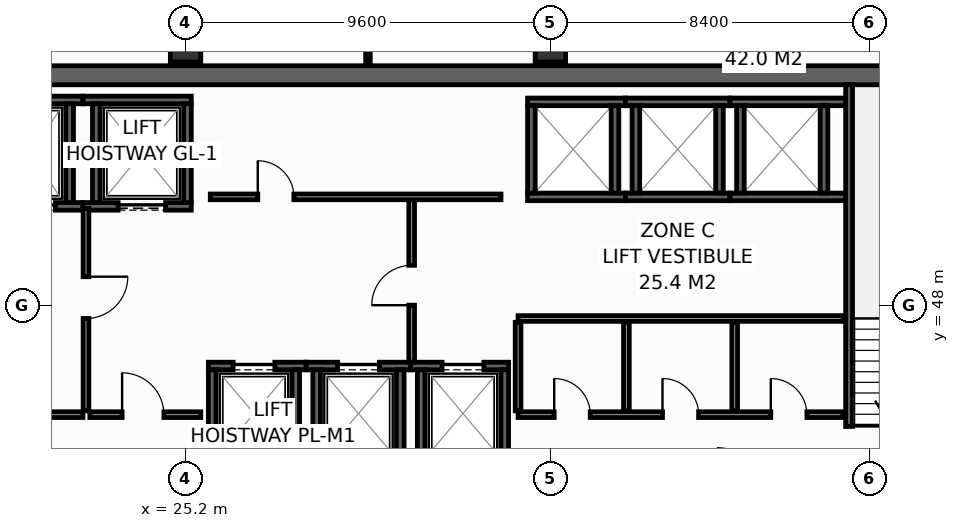
"""IFC4 building model, lengths in metres.
Left out: names, types, materials, properties, quantities, classifications, styles, units other than length and angle.
Written with IfcOpenShell. Run it as: python <this file> out.ifc"""

import sys

from ifc_helpers import new_model, si_unit, direction, frame, frame_2d, origin, origin_2d, place, context, subcontext, project, spatial, rectangle, hollow_rectangle, extrude, element, fill, save


model = new_model("IFC4")
c1 = context("Model", 3, precision=1e-05, world=origin(), true_north=direction((0.0, 1.0)))
c2 = subcontext(c1, "Body", "Model", "MODEL_VIEW")
j1 = project(units=[si_unit("LENGTHUNIT", "METRE"), si_unit("PLANEANGLEUNIT", "RADIAN")], contexts=[c1])
p1 = place(None, origin())
s1 = spatial("IfcSite", under=j1, at=p1, CompositionType="ELEMENT")
p2 = place(p1, origin())
s2 = spatial("IfcBuilding", under=s1, at=p2, CompositionType="ELEMENT")
p3 = place(p2, frame((0.0, 0.0, 201.8)))
s3 = spatial("IfcBuildingStorey", under=s2, at=p3, CompositionType="ELEMENT", Elevation=201.8)
p4 = place(p3, frame((13.6, 54.05, 0.0), z_axis=(0.0, 0.0, 1.0), x_axis=(1.0, 0.0, 0.0)))
e1 = element("IfcWall", 1, at=p4, inside=s3, PredefinedType="SHEAR", context=c2, shape_type="SweptSolid", body=[
    extrude(rectangle(XDim=32.7, YDim=0.5, at=frame_2d((16.35, 0.0))), origin(), (0.0, 0.0, 1.0), 3.55),
])
for number, where, z_axis, x_axis in (
    (2, (25.2, 54.8, 0.0), (0.0, 0.0, 1.0), (1.0, 0.0, 0.0)),
    (3, (34.8, 54.8, 0.0), (0.0, 0.0, 1.0), (1.0, 0.0, 0.0)),
):
    element("IfcColumn", number, at=place(p3, frame(where, z_axis=z_axis, x_axis=x_axis)), inside=s3, PredefinedType="COLUMN", context=c2, shape_type="SweptSolid", body=[
        extrude(hollow_rectangle(XDim=0.8, YDim=0.8, WallThickness=0.036, at=origin_2d()), origin(), (0.0, 0.0, 1.0), 3.8),
    ])
p5 = place(p3, frame((19.85, 50.6, 0.0), z_axis=(0.0, 0.0, 1.0), x_axis=(1.0, 0.0, 0.0)))
e4 = element("IfcWall", 4, at=p5, inside=s3, PredefinedType="SHEAR", context=c2, shape_type="SweptSolid", body=[
    extrude(rectangle(XDim=2.65, YDim=0.2, at=frame_2d((1.325, 0.0))), origin(), (0.0, 0.0, 1.0), 3.55),
])
p6 = place(p5, frame((0.675, 0.0, 0.0)))
e5 = element("IfcOpeningElement", 5, at=p6, cuts=e4, PredefinedType="OPENING", context=c2, shape_type="SweptSolid", body=[
    extrude(rectangle(XDim=1.25, YDim=2.3, at=frame_2d((0.625, 1.15))), frame((0.0, 0.11, 0.0), z_axis=(0.0, -1.0, 0.0), x_axis=(1.0, 0.0, 0.0)), (0.0, 0.0, 1.0), 0.22),
])
p7 = place(p3, frame((19.85, 53.4, 0.0), z_axis=(0.0, 0.0, 1.0), x_axis=(1.0, 0.0, 0.0)))
e6 = element("IfcWall", 6, at=p7, inside=s3, PredefinedType="SHEAR", context=c2, shape_type="SweptSolid", body=[
    extrude(rectangle(XDim=2.65, YDim=0.2, at=frame_2d((1.325, 0.0))), origin(), (0.0, 0.0, 1.0), 3.55),
])
p8 = place(p3, frame((22.15, 50.7, 0.0), z_axis=(0.0, 0.0, 1.0), x_axis=(0.0, 1.0, 0.0)))
e7 = element("IfcWall", 7, at=p8, inside=s3, PredefinedType="SHEAR", context=c2, shape_type="SweptSolid", body=[
    extrude(rectangle(XDim=2.6, YDim=0.2, at=frame_2d((1.3, 0.0))), origin(), (0.0, 0.0, 1.0), 3.55),
])
p9 = place(p3, frame((22.5, 50.6, 0.0), z_axis=(0.0, 0.0, 1.0), x_axis=(1.0, 0.0, 0.0)))
e8 = element("IfcWall", 8, at=p9, inside=s3, PredefinedType="SHEAR", context=c2, shape_type="SweptSolid", body=[
    extrude(rectangle(XDim=2.85, YDim=0.2, at=frame_2d((1.425, 0.0))), origin(), (0.0, 0.0, 1.0), 3.55),
])
p10 = place(p9, frame((0.925, 0.0, 0.0)))
e9 = element("IfcOpeningElement", 9, at=p10, cuts=e8, PredefinedType="OPENING", context=c2, shape_type="SweptSolid", body=[
    extrude(rectangle(XDim=1.25, YDim=2.3, at=frame_2d((0.625, 1.15))), frame((0.0, 0.11, 0.0), z_axis=(0.0, -1.0, 0.0), x_axis=(1.0, 0.0, 0.0)), (0.0, 0.0, 1.0), 0.22),
])
p11 = place(p3, frame((22.5, 53.4, 0.0), z_axis=(0.0, 0.0, 1.0), x_axis=(1.0, 0.0, 0.0)))
e10 = element("IfcWall", 10, at=p11, inside=s3, PredefinedType="SHEAR", context=c2, shape_type="SweptSolid", body=[
    extrude(rectangle(XDim=2.85, YDim=0.2, at=frame_2d((1.425, 0.0))), origin(), (0.0, 0.0, 1.0), 3.55),
])
for number, where, z_axis, x_axis in (
    (11, (22.85, 50.7, 0.0), (0.0, 0.0, 1.0), (0.0, 1.0, 0.0)),
    (12, (25.25, 50.7, 0.0), (0.0, 0.0, 1.0), (0.0, 1.0, 0.0)),
):
    element("IfcWall", number, at=place(p3, frame(where, z_axis=z_axis, x_axis=x_axis)), inside=s3, PredefinedType="SHEAR", context=c2, shape_type="SweptSolid", body=[
        extrude(rectangle(XDim=2.6, YDim=0.2, at=frame_2d((1.3, 0.0))), origin(), (0.0, 0.0, 1.0), 3.55),
    ])
p12 = place(p3, frame((25.8, 46.4, 0.0), z_axis=(0.0, 0.0, 1.0), x_axis=(1.0, 0.0, 0.0)))
e13 = element("IfcWall", 13, at=p12, inside=s3, PredefinedType="SHEAR", context=c2, shape_type="SweptSolid", body=[
    extrude(rectangle(XDim=2.575, YDim=0.2, at=frame_2d((1.288, 0.0))), origin(), (0.0, 0.0, 1.0), 3.55),
])
p13 = place(p12, frame((0.65, 0.0, 0.0)))
e14 = element("IfcOpeningElement", 14, at=p13, cuts=e13, PredefinedType="OPENING", context=c2, shape_type="SweptSolid", body=[
    extrude(rectangle(XDim=1.1, YDim=2.2, at=frame_2d((0.55, 1.1))), frame((0.0, 0.11, 0.0), z_axis=(0.0, -1.0, 0.0), x_axis=(1.0, 0.0, 0.0)), (0.0, 0.0, 1.0), 0.22),
])
for number, where, z_axis, x_axis in (
    (15, (25.9, 44.0, 0.0), (0.0, 0.0, 1.0), (0.0, 1.0, 0.0)),
    (16, (28.1, 44.0, 0.0), (0.0, 0.0, 1.0), (0.0, 1.0, 0.0)),
):
    element("IfcWall", number, at=place(p3, frame(where, z_axis=z_axis, x_axis=x_axis)), inside=s3, PredefinedType="SHEAR", context=c2, shape_type="SweptSolid", body=[
        extrude(rectangle(XDim=2.3, YDim=0.2, at=frame_2d((1.15, 0.0))), origin(), (0.0, 0.0, 1.0), 3.55),
    ])
p14 = place(p3, frame((28.375, 46.4, 0.0), z_axis=(0.0, 0.0, 1.0), x_axis=(1.0, 0.0, 0.0)))
e17 = element("IfcWall", 17, at=p14, inside=s3, PredefinedType="SHEAR", context=c2, shape_type="SweptSolid", body=[
    extrude(rectangle(XDim=2.75, YDim=0.2, at=frame_2d((1.375, 0.0))), origin(), (0.0, 0.0, 1.0), 3.55),
])
p15 = place(p14, frame((0.825, 0.0, 0.0)))
e18 = element("IfcOpeningElement", 18, at=p15, cuts=e17, PredefinedType="OPENING", context=c2, shape_type="SweptSolid", body=[
    extrude(rectangle(XDim=1.1, YDim=2.2, at=frame_2d((0.55, 1.1))), frame((0.0, 0.11, 0.0), z_axis=(0.0, -1.0, 0.0), x_axis=(1.0, 0.0, 0.0)), (0.0, 0.0, 1.0), 0.22),
])
for number, where, z_axis, x_axis in (
    (19, (28.65, 44.0, 0.0), (0.0, 0.0, 1.0), (0.0, 1.0, 0.0)),
    (20, (30.85, 44.0, 0.0), (0.0, 0.0, 1.0), (0.0, 1.0, 0.0)),
):
    element("IfcWall", number, at=place(p3, frame(where, z_axis=z_axis, x_axis=x_axis)), inside=s3, PredefinedType="SHEAR", context=c2, shape_type="SweptSolid", body=[
        extrude(rectangle(XDim=2.3, YDim=0.2, at=frame_2d((1.15, 0.0))), origin(), (0.0, 0.0, 1.0), 3.55),
    ])
p16 = place(p3, frame((31.125, 46.4, 0.0), z_axis=(0.0, 0.0, 1.0), x_axis=(1.0, 0.0, 0.0)))
e21 = element("IfcWall", 21, at=p16, inside=s3, PredefinedType="SHEAR", context=c2, shape_type="SweptSolid", body=[
    extrude(rectangle(XDim=2.575, YDim=0.2, at=frame_2d((1.288, 0.0))), origin(), (0.0, 0.0, 1.0), 3.55),
])
p17 = place(p16, frame((0.825, 0.0, 0.0)))
e22 = element("IfcOpeningElement", 22, at=p17, cuts=e21, PredefinedType="OPENING", context=c2, shape_type="SweptSolid", body=[
    extrude(rectangle(XDim=1.1, YDim=2.2, at=frame_2d((0.55, 1.1))), frame((0.0, 0.11, 0.0), z_axis=(0.0, -1.0, 0.0), x_axis=(1.0, 0.0, 0.0)), (0.0, 0.0, 1.0), 0.22),
])
for number, where, z_axis, x_axis in (
    (23, (31.4, 44.0, 0.0), (0.0, 0.0, 1.0), (0.0, 1.0, 0.0)),
    (24, (33.6, 44.0, 0.0), (0.0, 0.0, 1.0), (0.0, 1.0, 0.0)),
):
    element("IfcWall", number, at=place(p3, frame(where, z_axis=z_axis, x_axis=x_axis)), inside=s3, PredefinedType="SHEAR", context=c2, shape_type="SweptSolid", body=[
        extrude(rectangle(XDim=2.3, YDim=0.2, at=frame_2d((1.15, 0.0))), origin(), (0.0, 0.0, 1.0), 3.55),
    ])
for number, where, z_axis, x_axis in (
    (25, (34.2, 50.85, 0.0), (0.0, 0.0, 1.0), (1.0, 0.0, 0.0)),
    (26, (34.2, 53.35, 0.0), (0.0, 0.0, 1.0), (1.0, 0.0, 0.0)),
):
    element("IfcWall", number, at=place(p3, frame(where, z_axis=z_axis, x_axis=x_axis)), inside=s3, PredefinedType="SHEAR", context=c2, shape_type="SweptSolid", body=[
        extrude(rectangle(XDim=2.575, YDim=0.2, at=frame_2d((1.288, 0.0))), origin(), (0.0, 0.0, 1.0), 3.55),
    ])
for number, where, z_axis, x_axis in (
    (27, (34.3, 50.95, 0.0), (0.0, 0.0, 1.0), (0.0, 1.0, 0.0)),
    (28, (36.5, 50.95, 0.0), (0.0, 0.0, 1.0), (0.0, 1.0, 0.0)),
):
    element("IfcWall", number, at=place(p3, frame(where, z_axis=z_axis, x_axis=x_axis)), inside=s3, PredefinedType="SHEAR", context=c2, shape_type="SweptSolid", body=[
        extrude(rectangle(XDim=2.3, YDim=0.2, at=frame_2d((1.15, 0.0))), origin(), (0.0, 0.0, 1.0), 3.55),
    ])
for number, where, z_axis, x_axis in (
    (29, (36.775, 50.85, 0.0), (0.0, 0.0, 1.0), (1.0, 0.0, 0.0)),
    (30, (36.775, 53.35, 0.0), (0.0, 0.0, 1.0), (1.0, 0.0, 0.0)),
):
    element("IfcWall", number, at=place(p3, frame(where, z_axis=z_axis, x_axis=x_axis)), inside=s3, PredefinedType="SHEAR", context=c2, shape_type="SweptSolid", body=[
        extrude(rectangle(XDim=2.75, YDim=0.2, at=frame_2d((1.375, 0.0))), origin(), (0.0, 0.0, 1.0), 3.55),
    ])
for number, where, z_axis, x_axis in (
    (31, (37.05, 50.95, 0.0), (0.0, 0.0, 1.0), (0.0, 1.0, 0.0)),
    (32, (39.25, 50.95, 0.0), (0.0, 0.0, 1.0), (0.0, 1.0, 0.0)),
):
    element("IfcWall", number, at=place(p3, frame(where, z_axis=z_axis, x_axis=x_axis)), inside=s3, PredefinedType="SHEAR", context=c2, shape_type="SweptSolid", body=[
        extrude(rectangle(XDim=2.3, YDim=0.2, at=frame_2d((1.15, 0.0))), origin(), (0.0, 0.0, 1.0), 3.55),
    ])
for number, where, z_axis, x_axis in (
    (33, (39.525, 50.85, 0.0), (0.0, 0.0, 1.0), (1.0, 0.0, 0.0)),
    (34, (39.525, 53.35, 0.0), (0.0, 0.0, 1.0), (1.0, 0.0, 0.0)),
):
    element("IfcWall", number, at=place(p3, frame(where, z_axis=z_axis, x_axis=x_axis)), inside=s3, PredefinedType="SHEAR", context=c2, shape_type="SweptSolid", body=[
        extrude(rectangle(XDim=3.045, YDim=0.2, at=frame_2d((1.522, 0.0))), origin(), (0.0, 0.0, 1.0), 3.55),
    ])
for number, where, z_axis, x_axis in (
    (35, (39.8, 50.95, 0.0), (0.0, 0.0, 1.0), (0.0, 1.0, 0.0)),
    (36, (42.0, 50.95, 0.0), (0.0, 0.0, 1.0), (0.0, 1.0, 0.0)),
):
    element("IfcWall", number, at=place(p3, frame(where, z_axis=z_axis, x_axis=x_axis)), inside=s3, PredefinedType="SHEAR", context=c2, shape_type="SweptSolid", body=[
        extrude(rectangle(XDim=2.3, YDim=0.2, at=frame_2d((1.15, 0.0))), origin(), (0.0, 0.0, 1.0), 3.55),
    ])
p18 = place(p3, frame((42.66, 53.8, 0.0), z_axis=(0.0, 0.0, 1.0), x_axis=(0.0, -1.0, 0.0)))
e37 = element("IfcWall", 37, at=p18, inside=s3, PredefinedType="SHEAR", context=c2, shape_type="SweptSolid", body=[
    extrude(rectangle(XDim=10.4, YDim=0.18, at=frame_2d((5.2, 0.0))), origin(), (0.0, 0.0, 1.0), 3.55),
])
p19 = place(p18, frame((8.99, 0.0, 0.0)))
e38 = element("IfcOpeningElement", 38, at=p19, cuts=e37, PredefinedType="OPENING", context=c2, shape_type="SweptSolid", body=[
    extrude(rectangle(XDim=1.1, YDim=2.15, at=frame_2d((0.55, 1.075))), frame((0.0, 0.1, 0.0), z_axis=(0.0, -1.0, 0.0), x_axis=(1.0, 0.0, 0.0)), (0.0, 0.0, 1.0), 0.2),
])
p20 = place(p3, frame((17.36, 45.12, 0.0), z_axis=(0.0, 0.0, 1.0), x_axis=(1.0, 0.0, 0.0)))
e39 = element("IfcWall", 39, at=p20, inside=s3, PredefinedType="PARTITIONING", context=c2, shape_type="SweptSolid", body=[
    extrude(rectangle(XDim=5.14, YDim=0.15, at=frame_2d((2.57, 0.0))), origin(), (0.0, 0.0, 1.0), 3.55),
])
p21 = place(p20, frame((1.8, 0.0, 0.0)))
e40 = element("IfcOpeningElement", 40, at=p21, cuts=e39, PredefinedType="OPENING", context=c2, shape_type="SweptSolid", body=[
    extrude(rectangle(XDim=1.1, YDim=2.15, at=frame_2d((0.55, 1.075))), frame((0.0, 0.085, 0.0), z_axis=(0.0, -1.0, 0.0), x_axis=(1.0, 0.0, 0.0)), (0.0, 0.0, 1.0), 0.17),
])
p22 = place(p3, frame((22.58, 50.55, 0.0), z_axis=(0.0, 0.0, 1.0), x_axis=(0.0, -1.0, 0.0)))
e41 = element("IfcWall", 41, at=p22, inside=s3, PredefinedType="PARTITIONING", context=c2, shape_type="SweptSolid", body=[
    extrude(rectangle(XDim=5.33, YDim=0.15, at=frame_2d((2.665, 0.0))), origin(), (0.0, 0.0, 1.0), 3.55),
])
p23 = place(p22, frame((1.8, 0.0, 0.0)))
e42 = element("IfcOpeningElement", 42, at=p23, cuts=e41, PredefinedType="OPENING", context=c2, shape_type="SweptSolid", body=[
    extrude(rectangle(XDim=1.1, YDim=2.15, at=frame_2d((0.55, 1.075))), frame((0.0, 0.085, 0.0), z_axis=(0.0, -1.0, 0.0), x_axis=(1.0, 0.0, 0.0)), (0.0, 0.0, 1.0), 0.17),
])
p24 = place(p3, frame((22.68, 45.12, 0.0), z_axis=(0.0, 0.0, 1.0), x_axis=(1.0, 0.0, 0.0)))
e43 = element("IfcWall", 43, at=p24, inside=s3, PredefinedType="PARTITIONING", context=c2, shape_type="SweptSolid", body=[
    extrude(rectangle(XDim=2.92, YDim=0.15, at=frame_2d((1.46, 0.0))), origin(), (0.0, 0.0, 1.0), 3.55),
])
p25 = place(p24, frame((0.85, 0.0, 0.0)))
e44 = element("IfcOpeningElement", 44, at=p25, cuts=e43, PredefinedType="OPENING", context=c2, shape_type="SweptSolid", body=[
    extrude(rectangle(XDim=1.1, YDim=2.15, at=frame_2d((0.55, 1.075))), frame((0.0, 0.085, 0.0), z_axis=(0.0, -1.0, 0.0), x_axis=(1.0, 0.0, 0.0)), (0.0, 0.0, 1.0), 0.17),
])
p26 = place(p3, frame((31.15, 46.5, 0.0), z_axis=(0.0, 0.0, 1.0), x_axis=(0.0, 1.0, 0.0)))
e45 = element("IfcWall", 45, at=p26, inside=s3, PredefinedType="PARTITIONING", context=c2, shape_type="SweptSolid", body=[
    extrude(rectangle(XDim=4.35, YDim=0.15, at=frame_2d((2.175, 0.0))), origin(), (0.0, 0.0, 1.0), 3.55),
])
p27 = place(p26, frame((1.5, 0.0, 0.0)))
e46 = element("IfcOpeningElement", 46, at=p27, cuts=e45, PredefinedType="OPENING", context=c2, shape_type="SweptSolid", body=[
    extrude(rectangle(XDim=1.05, YDim=2.15, at=frame_2d((0.525, 1.075))), frame((0.0, 0.085, 0.0), z_axis=(0.0, -1.0, 0.0), x_axis=(1.0, 0.0, 0.0)), (0.0, 0.0, 1.0), 0.17),
])
p28 = place(p3, frame((33.95, 45.12, 0.0), z_axis=(0.0, 0.0, 1.0), x_axis=(1.0, 0.0, 0.0)))
e47 = element("IfcWall", 47, at=p28, inside=s3, PredefinedType="PARTITIONING", context=c2, shape_type="SweptSolid", body=[
    extrude(rectangle(XDim=8.55, YDim=0.15, at=frame_2d((4.275, 0.0))), origin(), (0.0, 0.0, 1.0), 3.55),
])
p29 = place(p28, frame((0.95, 0.0, 0.0)))
e48 = element("IfcOpeningElement", 48, at=p29, cuts=e47, PredefinedType="OPENING", context=c2, shape_type="SweptSolid", body=[
    extrude(rectangle(XDim=0.95, YDim=2.15, at=frame_2d((0.475, 1.075))), frame((0.0, 0.085, 0.0), z_axis=(0.0, -1.0, 0.0), x_axis=(1.0, 0.0, 0.0)), (0.0, 0.0, 1.0), 0.17),
])
p30 = place(p28, frame((3.8, 0.0, 0.0)))
e49 = element("IfcOpeningElement", 49, at=p30, cuts=e47, PredefinedType="OPENING", context=c2, shape_type="SweptSolid", body=[
    extrude(rectangle(XDim=0.95, YDim=2.15, at=frame_2d((0.475, 1.075))), frame((0.0, 0.085, 0.0), z_axis=(0.0, -1.0, 0.0), x_axis=(1.0, 0.0, 0.0)), (0.0, 0.0, 1.0), 0.17),
])
p31 = place(p28, frame((6.65, 0.0, 0.0)))
e50 = element("IfcOpeningElement", 50, at=p31, cuts=e47, PredefinedType="OPENING", context=c2, shape_type="SweptSolid", body=[
    extrude(rectangle(XDim=0.95, YDim=2.15, at=frame_2d((0.475, 1.075))), frame((0.0, 0.085, 0.0), z_axis=(0.0, -1.0, 0.0), x_axis=(1.0, 0.0, 0.0)), (0.0, 0.0, 1.0), 0.17),
])
p32 = place(p3, frame((33.95, 47.65, 0.0), z_axis=(0.0, 0.0, 1.0), x_axis=(1.0, 0.0, 0.0)))
e51 = element("IfcWall", 51, at=p32, inside=s3, PredefinedType="PARTITIONING", context=c2, shape_type="SweptSolid", body=[
    extrude(rectangle(XDim=8.55, YDim=0.15, at=frame_2d((4.275, 0.0))), origin(), (0.0, 0.0, 1.0), 3.55),
])
for number, where, z_axis, x_axis in (
    (52, (33.95, 45.22, 0.0), (0.0, 0.0, 1.0), (0.0, 1.0, 0.0)),
    (53, (36.8, 45.22, 0.0), (0.0, 0.0, 1.0), (0.0, 1.0, 0.0)),
    (54, (39.65, 45.22, 0.0), (0.0, 0.0, 1.0), (0.0, 1.0, 0.0)),
):
    element("IfcWall", number, at=place(p3, frame(where, z_axis=z_axis, x_axis=x_axis)), inside=s3, PredefinedType="PARTITIONING", context=c2, shape_type="SweptSolid", body=[
        extrude(rectangle(XDim=2.33, YDim=0.15, at=frame_2d((1.165, 0.0))), origin(), (0.0, 0.0, 1.0), 3.55),
    ])
p33 = place(p3, frame((25.85, 50.85, 0.0), z_axis=(0.0, 0.0, 1.0), x_axis=(1.0, 0.0, 0.0)))
e55 = element("IfcWall", 55, at=p33, inside=s3, PredefinedType="PARTITIONING", context=c2, shape_type="SweptSolid", body=[
    extrude(rectangle(XDim=7.65, YDim=0.15, at=frame_2d((3.825, 0.0))), origin(), (0.0, 0.0, 1.0), 3.55),
])
p34 = place(p33, frame((1.25, 0.0, 0.0)))
e56 = element("IfcOpeningElement", 56, at=p34, cuts=e55, PredefinedType="OPENING", context=c2, shape_type="SweptSolid", body=[
    extrude(rectangle(XDim=0.95, YDim=2.15, at=frame_2d((0.475, 1.075))), frame((0.0, 0.085, 0.0), z_axis=(0.0, -1.0, 0.0), x_axis=(1.0, 0.0, 0.0)), (0.0, 0.0, 1.0), 0.17),
])
p35 = place(p3, frame((30.0, 54.32, 0.0), z_axis=(0.0, 0.0, 1.0), x_axis=(0.0, 1.0, 0.0)))
e57 = element("IfcWall", 57, at=p35, inside=s3, PredefinedType="PARTITIONING", context=c2, shape_type="SweptSolid", body=[
    extrude(rectangle(XDim=1.675, YDim=0.12, at=frame_2d((0.837, 0.0))), origin(), (0.0, 0.0, 1.0), 2.935),
])
p36 = place(p6, origin())
e58 = element("IfcDoor", 58, at=p36, inside=s3, OperationType="SLIDING_TO_LEFT", PredefinedType="DOOR", context=c2, shape_type="SweptSolid", body=[
    extrude(rectangle(XDim=1.25, YDim=2.3, at=frame_2d((0.625, 1.15))), frame((0.0, 0.025, 0.0), z_axis=(0.0, -1.0, 0.0), x_axis=(1.0, 0.0, 0.0)), (0.0, 0.0, 1.0), 0.05),
])
fill(e5, e58)
p37 = place(p10, origin())
e59 = element("IfcDoor", 59, at=p37, inside=s3, OperationType="SLIDING_TO_LEFT", PredefinedType="DOOR", context=c2, shape_type="SweptSolid", body=[
    extrude(rectangle(XDim=1.25, YDim=2.3, at=frame_2d((0.625, 1.15))), frame((0.0, 0.025, 0.0), z_axis=(0.0, -1.0, 0.0), x_axis=(1.0, 0.0, 0.0)), (0.0, 0.0, 1.0), 0.05),
])
fill(e9, e59)
p38 = place(p13, origin())
e60 = element("IfcDoor", 60, at=p38, inside=s3, OperationType="SLIDING_TO_LEFT", PredefinedType="DOOR", context=c2, shape_type="SweptSolid", body=[
    extrude(rectangle(XDim=1.1, YDim=2.2, at=frame_2d((0.55, 1.1))), frame((0.0, 0.025, 0.0), z_axis=(0.0, -1.0, 0.0), x_axis=(1.0, 0.0, 0.0)), (0.0, 0.0, 1.0), 0.05),
])
fill(e14, e60)
p39 = place(p15, origin())
e61 = element("IfcDoor", 61, at=p39, inside=s3, OperationType="SLIDING_TO_LEFT", PredefinedType="DOOR", context=c2, shape_type="SweptSolid", body=[
    extrude(rectangle(XDim=1.1, YDim=2.2, at=frame_2d((0.55, 1.1))), frame((0.0, 0.025, 0.0), z_axis=(0.0, -1.0, 0.0), x_axis=(1.0, 0.0, 0.0)), (0.0, 0.0, 1.0), 0.05),
])
fill(e18, e61)
p40 = place(p17, origin())
e62 = element("IfcDoor", 62, at=p40, inside=s3, OperationType="SLIDING_TO_LEFT", PredefinedType="DOOR", context=c2, shape_type="SweptSolid", body=[
    extrude(rectangle(XDim=1.1, YDim=2.2, at=frame_2d((0.55, 1.1))), frame((0.0, 0.025, 0.0), z_axis=(0.0, -1.0, 0.0), x_axis=(1.0, 0.0, 0.0)), (0.0, 0.0, 1.0), 0.05),
])
fill(e22, e62)
p41 = place(p19, origin())
e63 = element("IfcDoor", 63, at=p41, inside=s3, OperationType="SINGLE_SWING_LEFT", PredefinedType="DOOR", context=c2, shape_type="SweptSolid", body=[
    extrude(rectangle(XDim=1.1, YDim=2.15, at=frame_2d((0.55, 1.075))), frame((0.0, 0.025, 0.0), z_axis=(0.0, -1.0, 0.0), x_axis=(1.0, 0.0, 0.0)), (0.0, 0.0, 1.0), 0.05),
])
fill(e38, e63)
p42 = place(p23, origin())
e64 = element("IfcDoor", 64, at=p42, inside=s3, OperationType="SINGLE_SWING_LEFT", PredefinedType="DOOR", context=c2, shape_type="SweptSolid", body=[
    extrude(rectangle(XDim=1.1, YDim=2.15, at=frame_2d((0.55, 1.075))), frame((0.0, 0.025, 0.0), z_axis=(0.0, -1.0, 0.0), x_axis=(1.0, 0.0, 0.0)), (0.0, 0.0, 1.0), 0.05),
])
fill(e42, e64)
p43 = place(p25, origin())
e65 = element("IfcDoor", 65, at=p43, inside=s3, OperationType="SINGLE_SWING_LEFT", PredefinedType="DOOR", context=c2, shape_type="SweptSolid", body=[
    extrude(rectangle(XDim=1.1, YDim=2.15, at=frame_2d((0.55, 1.075))), frame((0.0, 0.025, 0.0), z_axis=(0.0, -1.0, 0.0), x_axis=(1.0, 0.0, 0.0)), (0.0, 0.0, 1.0), 0.05),
])
fill(e44, e65)
p44 = place(p27, origin())
e66 = element("IfcDoor", 66, at=p44, inside=s3, OperationType="SINGLE_SWING_LEFT", PredefinedType="DOOR", context=c2, shape_type="SweptSolid", body=[
    extrude(rectangle(XDim=1.05, YDim=2.15, at=frame_2d((0.525, 1.075))), frame((0.0, 0.025, 0.0), z_axis=(0.0, -1.0, 0.0), x_axis=(1.0, 0.0, 0.0)), (0.0, 0.0, 1.0), 0.05),
])
fill(e46, e66)
p45 = place(p29, origin())
e67 = element("IfcDoor", 67, at=p45, inside=s3, OperationType="SINGLE_SWING_LEFT", PredefinedType="DOOR", context=c2, shape_type="SweptSolid", body=[
    extrude(rectangle(XDim=0.95, YDim=2.15, at=frame_2d((0.475, 1.075))), frame((0.0, 0.025, 0.0), z_axis=(0.0, -1.0, 0.0), x_axis=(1.0, 0.0, 0.0)), (0.0, 0.0, 1.0), 0.05),
])
fill(e48, e67)
p46 = place(p30, origin())
e68 = element("IfcDoor", 68, at=p46, inside=s3, OperationType="SINGLE_SWING_LEFT", PredefinedType="DOOR", context=c2, shape_type="SweptSolid", body=[
    extrude(rectangle(XDim=0.95, YDim=2.15, at=frame_2d((0.475, 1.075))), frame((0.0, 0.025, 0.0), z_axis=(0.0, -1.0, 0.0), x_axis=(1.0, 0.0, 0.0)), (0.0, 0.0, 1.0), 0.05),
])
fill(e49, e68)
p47 = place(p31, origin())
e69 = element("IfcDoor", 69, at=p47, inside=s3, OperationType="SINGLE_SWING_LEFT", PredefinedType="DOOR", context=c2, shape_type="SweptSolid", body=[
    extrude(rectangle(XDim=0.95, YDim=2.15, at=frame_2d((0.475, 1.075))), frame((0.0, 0.025, 0.0), z_axis=(0.0, -1.0, 0.0), x_axis=(1.0, 0.0, 0.0)), (0.0, 0.0, 1.0), 0.05),
])
fill(e50, e69)
p48 = place(p34, origin())
e70 = element("IfcDoor", 70, at=p48, inside=s3, OperationType="SINGLE_SWING_LEFT", PredefinedType="DOOR", context=c2, shape_type="SweptSolid", body=[
    extrude(rectangle(XDim=0.95, YDim=2.15, at=frame_2d((0.475, 1.075))), frame((0.0, 0.025, 0.0), z_axis=(0.0, -1.0, 0.0), x_axis=(1.0, 0.0, 0.0)), (0.0, 0.0, 1.0), 0.05),
])
fill(e56, e70)
save(model, sys.argv[1])
